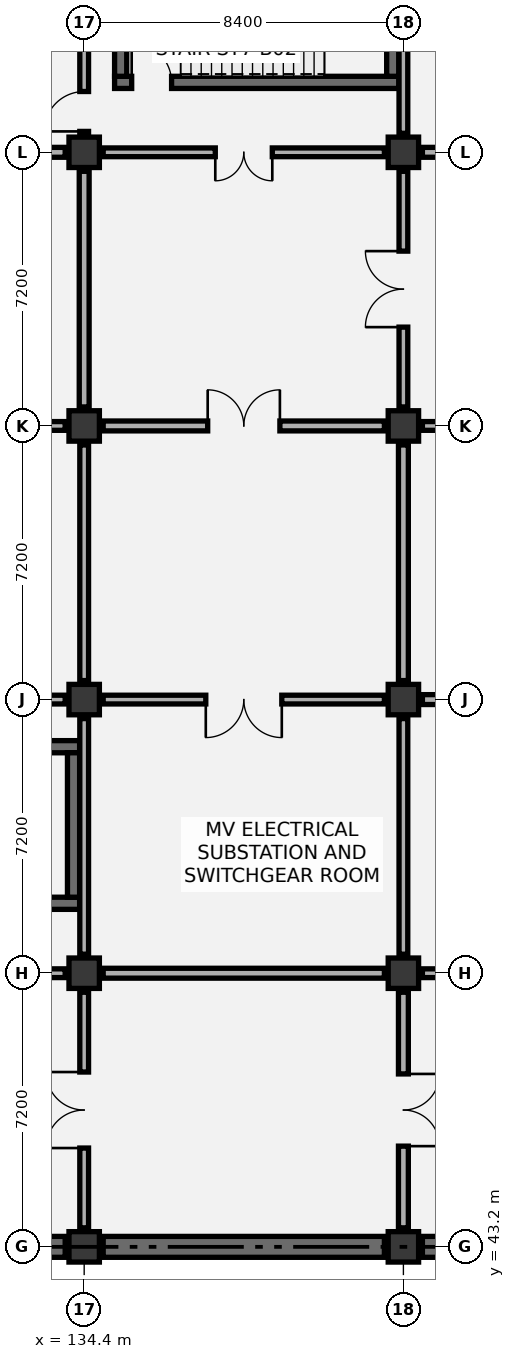
"""IFC4 building model, lengths in metres.
Left out: names, types, materials, properties, quantities, classifications, styles, units other than length and angle.
Written with IfcOpenShell. Run it as: python <this file> out.ifc"""

import sys

from ifc_helpers import new_model, si_unit, direction, frame, frame_2d, origin, origin_2d, place, context, subcontext, project, spatial, rectangle, extrude, element, fill, save


model = new_model("IFC4")
c1 = context("Model", 3, precision=1e-05, world=origin(), true_north=direction((0.0, 1.0)))
c2 = subcontext(c1, "Body", "Model", "MODEL_VIEW")
j1 = project(units=[si_unit("LENGTHUNIT", "METRE"), si_unit("PLANEANGLEUNIT", "RADIAN")], contexts=[c1])
p1 = place(None, origin())
s1 = spatial("IfcSite", under=j1, at=p1, CompositionType="ELEMENT")
p2 = place(p1, origin())
s2 = spatial("IfcBuilding", under=s1, at=p2, CompositionType="ELEMENT")
p3 = place(p2, frame((0.0, 0.0, -9.6)))
s3 = spatial("IfcBuildingStorey", under=s2, at=p3, CompositionType="ELEMENT", Elevation=-9.6)
for number, where, z_axis, x_axis in (
    (1, (134.4, 43.2, 0.0), (0.0, 0.0, 1.0), (1.0, 0.0, 0.0)),
    (2, (134.4, 50.4, 0.0), (0.0, 0.0, 1.0), (1.0, 0.0, 0.0)),
    (3, (134.4, 57.6, 0.0), (0.0, 0.0, 1.0), (1.0, 0.0, 0.0)),
    (4, (134.4, 64.8, 0.0), (0.0, 0.0, 1.0), (1.0, 0.0, 0.0)),
    (5, (134.4, 72.0, 0.0), (0.0, 0.0, 1.0), (1.0, 0.0, 0.0)),
    (6, (142.8, 43.2, 0.0), (0.0, 0.0, 1.0), (1.0, 0.0, 0.0)),
    (7, (142.8, 50.4, 0.0), (0.0, 0.0, 1.0), (1.0, 0.0, 0.0)),
    (8, (142.8, 57.6, 0.0), (0.0, 0.0, 1.0), (1.0, 0.0, 0.0)),
    (9, (142.8, 64.8, 0.0), (0.0, 0.0, 1.0), (1.0, 0.0, 0.0)),
    (10, (142.8, 72.0, 0.0), (0.0, 0.0, 1.0), (1.0, 0.0, 0.0)),
):
    element("IfcColumn", number, at=place(p3, frame(where, z_axis=z_axis, x_axis=x_axis)), inside=s3, PredefinedType="COLUMN", context=c2, shape_type="SweptSolid", body=[
        extrude(rectangle(XDim=0.8, YDim=0.8, at=origin_2d()), origin(), (0.0, 0.0, 1.0), 4.8),
    ])
p4 = place(p3, frame((126.5, 43.2, 0.0), z_axis=(0.0, 0.0, 1.0), x_axis=(1.0, 0.0, 0.0)))
e11 = element("IfcWall", 11, at=p4, inside=s3, PredefinedType="USERDEFINED", context=c2, shape_type="SweptSolid", body=[
    extrude(rectangle(XDim=7.4, YDim=0.55, at=frame_2d((3.7, 0.0))), origin(), (0.0, 0.0, 1.0), 4.4),
])
p5 = place(p3, frame((134.9, 43.2, 0.0), z_axis=(0.0, 0.0, 1.0), x_axis=(1.0, 0.0, 0.0)))
e12 = element("IfcWall", 12, at=p5, inside=s3, PredefinedType="USERDEFINED", context=c2, shape_type="SweptSolid", body=[
    extrude(rectangle(XDim=7.4, YDim=0.55, at=frame_2d((3.7, 0.0))), origin(), (0.0, 0.0, 1.0), 4.4),
])
p6 = place(p3, frame((143.3, 43.2, 0.0), z_axis=(0.0, 0.0, 1.0), x_axis=(1.0, 0.0, 0.0)))
e13 = element("IfcWall", 13, at=p6, inside=s3, PredefinedType="USERDEFINED", context=c2, shape_type="SweptSolid", body=[
    extrude(rectangle(XDim=7.4, YDim=0.55, at=frame_2d((3.7, 0.0))), origin(), (0.0, 0.0, 1.0), 4.4),
])
p7 = place(p3, frame((126.8, 52.24, 0.0), z_axis=(0.0, 0.0, 1.0), x_axis=(1.0, 0.0, 0.0)))
e14 = element("IfcWall", 14, at=p7, inside=s3, PredefinedType="SHEAR", context=c2, shape_type="SweptSolid", body=[
    extrude(rectangle(XDim=7.48, YDim=0.32, at=frame_2d((3.74, 0.0))), origin(), (0.0, 0.0, 1.0), 4.4),
])
p8 = place(p7, frame((0.45, 0.0, 0.0)))
e15 = element("IfcOpeningElement", 15, at=p8, cuts=e14, PredefinedType="OPENING", context=c2, shape_type="SweptSolid", body=[
    extrude(rectangle(XDim=1.05, YDim=2.15, at=frame_2d((0.525, 1.075))), frame((0.0, 0.17, 0.0), z_axis=(0.0, -1.0, 0.0), x_axis=(1.0, 0.0, 0.0)), (0.0, 0.0, 1.0), 0.34),
])
p9 = place(p3, frame((126.8, 56.36, 0.0), z_axis=(0.0, 0.0, 1.0), x_axis=(1.0, 0.0, 0.0)))
e16 = element("IfcWall", 16, at=p9, inside=s3, PredefinedType="SHEAR", context=c2, shape_type="SweptSolid", body=[
    extrude(rectangle(XDim=7.48, YDim=0.32, at=frame_2d((3.74, 0.0))), origin(), (0.0, 0.0, 1.0), 4.4),
])
p10 = place(p3, frame((134.12, 52.4, 0.0), z_axis=(0.0, 0.0, 1.0), x_axis=(0.0, 1.0, 0.0)))
e17 = element("IfcWall", 17, at=p10, inside=s3, PredefinedType="SHEAR", context=c2, shape_type="SweptSolid", body=[
    extrude(rectangle(XDim=3.8, YDim=0.32, at=frame_2d((1.9, 0.0))), origin(), (0.0, 0.0, 1.0), 4.4),
])
p11 = place(p3, frame((135.2, 73.84, 0.0), z_axis=(0.0, 0.0, 1.0), x_axis=(1.0, 0.0, 0.0)))
e18 = element("IfcWall", 18, at=p11, inside=s3, PredefinedType="SHEAR", context=c2, shape_type="SweptSolid", body=[
    extrude(rectangle(XDim=7.48, YDim=0.32, at=frame_2d((3.74, 0.0))), origin(), (0.0, 0.0, 1.0), 4.4),
])
p12 = place(p11, frame((0.45, 0.0, 0.0)))
e19 = element("IfcOpeningElement", 19, at=p12, cuts=e18, PredefinedType="OPENING", context=c2, shape_type="SweptSolid", body=[
    extrude(rectangle(XDim=1.05, YDim=2.15, at=frame_2d((0.525, 1.075))), frame((0.0, 0.17, 0.0), z_axis=(0.0, -1.0, 0.0), x_axis=(1.0, 0.0, 0.0)), (0.0, 0.0, 1.0), 0.34),
])
for number, where, z_axis, x_axis in (
    (20, (135.36, 74.0, 0.0), (0.0, 0.0, 1.0), (0.0, 1.0, 0.0)),
    (21, (142.52, 74.0, 0.0), (0.0, 0.0, 1.0), (0.0, 1.0, 0.0)),
):
    element("IfcWall", number, at=place(p3, frame(where, z_axis=z_axis, x_axis=x_axis)), inside=s3, PredefinedType="SHEAR", context=c2, shape_type="SweptSolid", body=[
        extrude(rectangle(XDim=3.8, YDim=0.32, at=frame_2d((1.9, 0.0))), origin(), (0.0, 0.0, 1.0), 4.4),
    ])
p13 = place(p3, frame((134.4, 43.7, 0.0), z_axis=(0.0, 0.0, 1.0), x_axis=(0.0, 1.0, 0.0)))
e22 = element("IfcWall", 22, at=p13, inside=s3, PredefinedType="PARTITIONING", context=c2, shape_type="SweptSolid", body=[
    extrude(rectangle(XDim=6.2, YDim=0.23, at=frame_2d((3.1, 0.0))), origin(), (0.0, 0.0, 1.0), 3.595),
])
p14 = place(p13, frame((2.1, 0.0, 0.0)))
e23 = element("IfcOpeningElement", 23, at=p14, cuts=e22, PredefinedType="OPENING", context=c2, shape_type="SweptSolid", body=[
    extrude(rectangle(XDim=2.0, YDim=2.35, at=frame_2d((1.0, 1.175))), frame((0.0, 0.125, 0.0), z_axis=(0.0, -1.0, 0.0), x_axis=(1.0, 0.0, 0.0)), (0.0, 0.0, 1.0), 0.25),
])
p15 = place(p3, frame((126.5, 50.4, 0.0), z_axis=(0.0, 0.0, 1.0), x_axis=(1.0, 0.0, 0.0)))
e24 = element("IfcWall", 24, at=p15, inside=s3, PredefinedType="PARTITIONING", context=c2, shape_type="SweptSolid", body=[
    extrude(rectangle(XDim=7.4, YDim=0.23, at=frame_2d((3.7, 0.0))), origin(), (0.0, 0.0, 1.0), 3.495),
])
p16 = place(p15, frame((2.95, 0.0, 0.0)))
e25 = element("IfcOpeningElement", 25, at=p16, cuts=e24, PredefinedType="OPENING", context=c2, shape_type="SweptSolid", body=[
    extrude(rectangle(XDim=1.5, YDim=2.15, at=frame_2d((0.75, 1.075))), frame((0.0, 0.125, 0.0), z_axis=(0.0, -1.0, 0.0), x_axis=(1.0, 0.0, 0.0)), (0.0, 0.0, 1.0), 0.25),
])
p17 = place(p3, frame((134.4, 50.9, 0.0), z_axis=(0.0, 0.0, 1.0), x_axis=(0.0, 1.0, 0.0)))
e26 = element("IfcWall", 26, at=p17, inside=s3, PredefinedType="PARTITIONING", context=c2, shape_type="SweptSolid", body=[
    extrude(rectangle(XDim=6.2, YDim=0.23, at=frame_2d((3.1, 0.0))), origin(), (0.0, 0.0, 1.0), 3.595),
])
p18 = place(p3, frame((126.5, 57.6, 0.0), z_axis=(0.0, 0.0, 1.0), x_axis=(1.0, 0.0, 0.0)))
e27 = element("IfcWall", 27, at=p18, inside=s3, PredefinedType="PARTITIONING", context=c2, shape_type="SweptSolid", body=[
    extrude(rectangle(XDim=7.4, YDim=0.23, at=frame_2d((3.7, 0.0))), origin(), (0.0, 0.0, 1.0), 3.495),
])
p19 = place(p3, frame((134.4, 58.1, 0.0), z_axis=(0.0, 0.0, 1.0), x_axis=(0.0, 1.0, 0.0)))
e28 = element("IfcWall", 28, at=p19, inside=s3, PredefinedType="PARTITIONING", context=c2, shape_type="SweptSolid", body=[
    extrude(rectangle(XDim=6.2, YDim=0.23, at=frame_2d((3.1, 0.0))), origin(), (0.0, 0.0, 1.0), 3.595),
])
p20 = place(p3, frame((126.5, 64.8, 0.0), z_axis=(0.0, 0.0, 1.0), x_axis=(1.0, 0.0, 0.0)))
e29 = element("IfcWall", 29, at=p20, inside=s3, PredefinedType="PARTITIONING", context=c2, shape_type="SweptSolid", body=[
    extrude(rectangle(XDim=7.4, YDim=0.23, at=frame_2d((3.7, 0.0))), origin(), (0.0, 0.0, 1.0), 3.495),
])
p21 = place(p20, frame((2.7, 0.0, 0.0)))
e30 = element("IfcOpeningElement", 30, at=p21, cuts=e29, PredefinedType="OPENING", context=c2, shape_type="SweptSolid", body=[
    extrude(rectangle(XDim=2.0, YDim=2.35, at=frame_2d((1.0, 1.175))), frame((0.0, 0.125, 0.0), z_axis=(0.0, -1.0, 0.0), x_axis=(1.0, 0.0, 0.0)), (0.0, 0.0, 1.0), 0.25),
])
p22 = place(p3, frame((134.4, 65.3, 0.0), z_axis=(0.0, 0.0, 1.0), x_axis=(0.0, 1.0, 0.0)))
e31 = element("IfcWall", 31, at=p22, inside=s3, PredefinedType="PARTITIONING", context=c2, shape_type="SweptSolid", body=[
    extrude(rectangle(XDim=6.2, YDim=0.26, at=frame_2d((3.1, 0.0))), origin(), (0.0, 0.0, 1.0), 3.595),
])
p23 = place(p3, frame((126.5, 72.0, 0.0), z_axis=(0.0, 0.0, 1.0), x_axis=(1.0, 0.0, 0.0)))
e32 = element("IfcWall", 32, at=p23, inside=s3, PredefinedType="PARTITIONING", context=c2, shape_type="SweptSolid", body=[
    extrude(rectangle(XDim=7.4, YDim=0.26, at=frame_2d((3.7, 0.0))), origin(), (0.0, 0.0, 1.0), 3.495),
])
p24 = place(p23, frame((2.75, 0.0, 0.0)))
e33 = element("IfcOpeningElement", 33, at=p24, cuts=e32, PredefinedType="OPENING", context=c2, shape_type="SweptSolid", body=[
    extrude(rectangle(XDim=1.9, YDim=2.3, at=frame_2d((0.95, 1.15))), frame((0.0, 0.14, 0.0), z_axis=(0.0, -1.0, 0.0), x_axis=(1.0, 0.0, 0.0)), (0.0, 0.0, 1.0), 0.28),
])
p25 = place(p3, frame((134.4, 72.5, 0.0), z_axis=(0.0, 0.0, 1.0), x_axis=(0.0, 1.0, 0.0)))
e34 = element("IfcWall", 34, at=p25, inside=s3, PredefinedType="PARTITIONING", context=c2, shape_type="SweptSolid", body=[
    extrude(rectangle(XDim=6.2, YDim=0.23, at=frame_2d((3.1, 0.0))), origin(), (0.0, 0.0, 1.0), 3.595),
])
p26 = place(p25, frame((0.05, 0.0, 0.0)))
e35 = element("IfcOpeningElement", 35, at=p26, cuts=e34, PredefinedType="OPENING", context=c2, shape_type="SweptSolid", body=[
    extrude(rectangle(XDim=1.05, YDim=2.15, at=frame_2d((0.525, 1.075))), frame((0.0, 0.125, 0.0), z_axis=(0.0, -1.0, 0.0), x_axis=(1.0, 0.0, 0.0)), (0.0, 0.0, 1.0), 0.25),
])
p27 = place(p3, frame((142.8, 43.7, 0.0), z_axis=(0.0, 0.0, 1.0), x_axis=(0.0, 1.0, 0.0)))
e36 = element("IfcWall", 36, at=p27, inside=s3, PredefinedType="PARTITIONING", context=c2, shape_type="SweptSolid", body=[
    extrude(rectangle(XDim=6.2, YDim=0.26, at=frame_2d((3.1, 0.0))), origin(), (0.0, 0.0, 1.0), 3.595),
])
p28 = place(p27, frame((2.15, 0.0, 0.0)))
e37 = element("IfcOpeningElement", 37, at=p28, cuts=e36, PredefinedType="OPENING", context=c2, shape_type="SweptSolid", body=[
    extrude(rectangle(XDim=1.9, YDim=2.3, at=frame_2d((0.95, 1.15))), frame((0.0, 0.14, 0.0), z_axis=(0.0, -1.0, 0.0), x_axis=(1.0, 0.0, 0.0)), (0.0, 0.0, 1.0), 0.28),
])
p29 = place(p3, frame((134.9, 50.4, 0.0), z_axis=(0.0, 0.0, 1.0), x_axis=(1.0, 0.0, 0.0)))
e38 = element("IfcWall", 38, at=p29, inside=s3, PredefinedType="PARTITIONING", context=c2, shape_type="SweptSolid", body=[
    extrude(rectangle(XDim=7.4, YDim=0.26, at=frame_2d((3.7, 0.0))), origin(), (0.0, 0.0, 1.0), 3.495),
])
p30 = place(p3, frame((142.8, 50.9, 0.0), z_axis=(0.0, 0.0, 1.0), x_axis=(0.0, 1.0, 0.0)))
e39 = element("IfcWall", 39, at=p30, inside=s3, PredefinedType="PARTITIONING", context=c2, shape_type="SweptSolid", body=[
    extrude(rectangle(XDim=6.2, YDim=0.23, at=frame_2d((3.1, 0.0))), origin(), (0.0, 0.0, 1.0), 3.595),
])
p31 = place(p3, frame((134.9, 57.6, 0.0), z_axis=(0.0, 0.0, 1.0), x_axis=(1.0, 0.0, 0.0)))
e40 = element("IfcWall", 40, at=p31, inside=s3, PredefinedType="PARTITIONING", context=c2, shape_type="SweptSolid", body=[
    extrude(rectangle(XDim=7.4, YDim=0.23, at=frame_2d((3.7, 0.0))), origin(), (0.0, 0.0, 1.0), 3.495),
])
p32 = place(p31, frame((2.7, 0.0, 0.0)))
e41 = element("IfcOpeningElement", 41, at=p32, cuts=e40, PredefinedType="OPENING", context=c2, shape_type="SweptSolid", body=[
    extrude(rectangle(XDim=2.0, YDim=2.35, at=frame_2d((1.0, 1.175))), frame((0.0, 0.125, 0.0), z_axis=(0.0, -1.0, 0.0), x_axis=(1.0, 0.0, 0.0)), (0.0, 0.0, 1.0), 0.25),
])
p33 = place(p3, frame((142.8, 58.1, 0.0), z_axis=(0.0, 0.0, 1.0), x_axis=(0.0, 1.0, 0.0)))
e42 = element("IfcWall", 42, at=p33, inside=s3, PredefinedType="PARTITIONING", context=c2, shape_type="SweptSolid", body=[
    extrude(rectangle(XDim=6.2, YDim=0.26, at=frame_2d((3.1, 0.0))), origin(), (0.0, 0.0, 1.0), 3.595),
])
p34 = place(p3, frame((134.9, 64.8, 0.0), z_axis=(0.0, 0.0, 1.0), x_axis=(1.0, 0.0, 0.0)))
e43 = element("IfcWall", 43, at=p34, inside=s3, PredefinedType="PARTITIONING", context=c2, shape_type="SweptSolid", body=[
    extrude(rectangle(XDim=7.4, YDim=0.26, at=frame_2d((3.7, 0.0))), origin(), (0.0, 0.0, 1.0), 3.495),
])
p35 = place(p34, frame((2.75, 0.0, 0.0)))
e44 = element("IfcOpeningElement", 44, at=p35, cuts=e43, PredefinedType="OPENING", context=c2, shape_type="SweptSolid", body=[
    extrude(rectangle(XDim=1.9, YDim=2.3, at=frame_2d((0.95, 1.15))), frame((0.0, 0.14, 0.0), z_axis=(0.0, -1.0, 0.0), x_axis=(1.0, 0.0, 0.0)), (0.0, 0.0, 1.0), 0.28),
])
p36 = place(p3, frame((142.8, 65.3, 0.0), z_axis=(0.0, 0.0, 1.0), x_axis=(0.0, 1.0, 0.0)))
e45 = element("IfcWall", 45, at=p36, inside=s3, PredefinedType="PARTITIONING", context=c2, shape_type="SweptSolid", body=[
    extrude(rectangle(XDim=6.2, YDim=0.23, at=frame_2d((3.1, 0.0))), origin(), (0.0, 0.0, 1.0), 3.595),
])
p37 = place(p36, frame((2.1, 0.0, 0.0)))
e46 = element("IfcOpeningElement", 46, at=p37, cuts=e45, PredefinedType="OPENING", context=c2, shape_type="SweptSolid", body=[
    extrude(rectangle(XDim=2.0, YDim=2.35, at=frame_2d((1.0, 1.175))), frame((0.0, 0.125, 0.0), z_axis=(0.0, -1.0, 0.0), x_axis=(1.0, 0.0, 0.0)), (0.0, 0.0, 1.0), 0.25),
])
p38 = place(p3, frame((134.9, 72.0, 0.0), z_axis=(0.0, 0.0, 1.0), x_axis=(1.0, 0.0, 0.0)))
e47 = element("IfcWall", 47, at=p38, inside=s3, PredefinedType="PARTITIONING", context=c2, shape_type="SweptSolid", body=[
    extrude(rectangle(XDim=7.4, YDim=0.23, at=frame_2d((3.7, 0.0))), origin(), (0.0, 0.0, 1.0), 3.495),
])
p39 = place(p38, frame((2.95, 0.0, 0.0)))
e48 = element("IfcOpeningElement", 48, at=p39, cuts=e47, PredefinedType="OPENING", context=c2, shape_type="SweptSolid", body=[
    extrude(rectangle(XDim=1.5, YDim=2.15, at=frame_2d((0.75, 1.075))), frame((0.0, 0.125, 0.0), z_axis=(0.0, -1.0, 0.0), x_axis=(1.0, 0.0, 0.0)), (0.0, 0.0, 1.0), 0.25),
])
p40 = place(p3, frame((142.8, 72.5, 0.0), z_axis=(0.0, 0.0, 1.0), x_axis=(0.0, 1.0, 0.0)))
e49 = element("IfcWall", 49, at=p40, inside=s3, PredefinedType="PARTITIONING", context=c2, shape_type="SweptSolid", body=[
    extrude(rectangle(XDim=6.2, YDim=0.23, at=frame_2d((3.1, 0.0))), origin(), (0.0, 0.0, 1.0), 3.595),
])
p41 = place(p3, frame((143.3, 50.4, 0.0), z_axis=(0.0, 0.0, 1.0), x_axis=(1.0, 0.0, 0.0)))
e50 = element("IfcWall", 50, at=p41, inside=s3, PredefinedType="PARTITIONING", context=c2, shape_type="SweptSolid", body=[
    extrude(rectangle(XDim=7.4, YDim=0.23, at=frame_2d((3.7, 0.0))), origin(), (0.0, 0.0, 1.0), 3.495),
])
p42 = place(p3, frame((143.3, 57.6, 0.0), z_axis=(0.0, 0.0, 1.0), x_axis=(1.0, 0.0, 0.0)))
e51 = element("IfcWall", 51, at=p42, inside=s3, PredefinedType="PARTITIONING", context=c2, shape_type="SweptSolid", body=[
    extrude(rectangle(XDim=7.4, YDim=0.26, at=frame_2d((3.7, 0.0))), origin(), (0.0, 0.0, 1.0), 3.495),
])
p43 = place(p42, frame((2.7, 0.0, 0.0)))
e52 = element("IfcOpeningElement", 52, at=p43, cuts=e51, PredefinedType="OPENING", context=c2, shape_type="SweptSolid", body=[
    extrude(rectangle(XDim=2.0, YDim=2.35, at=frame_2d((1.0, 1.175))), frame((0.0, 0.14, 0.0), z_axis=(0.0, -1.0, 0.0), x_axis=(1.0, 0.0, 0.0)), (0.0, 0.0, 1.0), 0.28),
])
p44 = place(p3, frame((143.3, 64.8, 0.0), z_axis=(0.0, 0.0, 1.0), x_axis=(1.0, 0.0, 0.0)))
e53 = element("IfcWall", 53, at=p44, inside=s3, PredefinedType="PARTITIONING", context=c2, shape_type="SweptSolid", body=[
    extrude(rectangle(XDim=7.4, YDim=0.23, at=frame_2d((3.7, 0.0))), origin(), (0.0, 0.0, 1.0), 3.495),
])
p45 = place(p44, frame((2.75, 0.0, 0.0)))
e54 = element("IfcOpeningElement", 54, at=p45, cuts=e53, PredefinedType="OPENING", context=c2, shape_type="SweptSolid", body=[
    extrude(rectangle(XDim=1.9, YDim=2.3, at=frame_2d((0.95, 1.15))), frame((0.0, 0.125, 0.0), z_axis=(0.0, -1.0, 0.0), x_axis=(1.0, 0.0, 0.0)), (0.0, 0.0, 1.0), 0.25),
])
p46 = place(p3, frame((143.3, 72.0, 0.0), z_axis=(0.0, 0.0, 1.0), x_axis=(1.0, 0.0, 0.0)))
e55 = element("IfcWall", 55, at=p46, inside=s3, PredefinedType="PARTITIONING", context=c2, shape_type="SweptSolid", body=[
    extrude(rectangle(XDim=7.4, YDim=0.26, at=frame_2d((3.7, 0.0))), origin(), (0.0, 0.0, 1.0), 3.495),
])
p47 = place(p46, frame((2.75, 0.0, 0.0)))
e56 = element("IfcOpeningElement", 56, at=p47, cuts=e55, PredefinedType="OPENING", context=c2, shape_type="SweptSolid", body=[
    extrude(rectangle(XDim=1.9, YDim=2.3, at=frame_2d((0.95, 1.15))), frame((0.0, 0.14, 0.0), z_axis=(0.0, -1.0, 0.0), x_axis=(1.0, 0.0, 0.0)), (0.0, 0.0, 1.0), 0.28),
])
p48 = place(p12, origin())
e57 = element("IfcDoor", 57, at=p48, inside=s3, OperationType="SINGLE_SWING_LEFT", PredefinedType="DOOR", context=c2, shape_type="SweptSolid", body=[
    extrude(rectangle(XDim=1.05, YDim=2.15, at=frame_2d((0.525, 1.075))), frame((0.0, 0.025, 0.0), z_axis=(0.0, -1.0, 0.0), x_axis=(1.0, 0.0, 0.0)), (0.0, 0.0, 1.0), 0.05),
])
fill(e19, e57)
p49 = place(p14, origin())
e58 = element("IfcDoor", 58, at=p49, inside=s3, OperationType="DOUBLE_DOOR_SINGLE_SWING", PredefinedType="DOOR", context=c2, shape_type="SweptSolid", body=[
    extrude(rectangle(XDim=2.0, YDim=2.35, at=frame_2d((1.0, 1.175))), frame((0.0, 0.025, 0.0), z_axis=(0.0, -1.0, 0.0), x_axis=(1.0, 0.0, 0.0)), (0.0, 0.0, 1.0), 0.05),
])
fill(e23, e58)
p50 = place(p26, origin())
e59 = element("IfcDoor", 59, at=p50, inside=s3, OperationType="SINGLE_SWING_LEFT", PredefinedType="DOOR", context=c2, shape_type="SweptSolid", body=[
    extrude(rectangle(XDim=1.05, YDim=2.15, at=frame_2d((0.525, 1.075))), frame((0.0, 0.025, 0.0), z_axis=(0.0, -1.0, 0.0), x_axis=(1.0, 0.0, 0.0)), (0.0, 0.0, 1.0), 0.05),
])
fill(e35, e59)
p51 = place(p28, frame((1.9, 0.0, 0.0), z_axis=(0.0, 0.0, 1.0), x_axis=(-1.0, 0.0, 0.0)))
e60 = element("IfcDoor", 60, at=p51, inside=s3, OperationType="DOUBLE_DOOR_SINGLE_SWING", PredefinedType="DOOR", context=c2, shape_type="SweptSolid", body=[
    extrude(rectangle(XDim=1.9, YDim=2.3, at=frame_2d((0.95, 1.15))), frame((0.0, 0.025, 0.0), z_axis=(0.0, -1.0, 0.0), x_axis=(1.0, 0.0, 0.0)), (0.0, 0.0, 1.0), 0.05),
])
fill(e37, e60)
p52 = place(p32, frame((2.0, 0.0, 0.0), z_axis=(0.0, 0.0, 1.0), x_axis=(-1.0, 0.0, 0.0)))
e61 = element("IfcDoor", 61, at=p52, inside=s3, OperationType="DOUBLE_DOOR_SINGLE_SWING", PredefinedType="DOOR", context=c2, shape_type="SweptSolid", body=[
    extrude(rectangle(XDim=2.0, YDim=2.35, at=frame_2d((1.0, 1.175))), frame((0.0, 0.025, 0.0), z_axis=(0.0, -1.0, 0.0), x_axis=(1.0, 0.0, 0.0)), (0.0, 0.0, 1.0), 0.05),
])
fill(e41, e61)
p53 = place(p35, origin())
e62 = element("IfcDoor", 62, at=p53, inside=s3, OperationType="DOUBLE_DOOR_SINGLE_SWING", PredefinedType="DOOR", context=c2, shape_type="SweptSolid", body=[
    extrude(rectangle(XDim=1.9, YDim=2.3, at=frame_2d((0.95, 1.15))), frame((0.0, 0.025, 0.0), z_axis=(0.0, -1.0, 0.0), x_axis=(1.0, 0.0, 0.0)), (0.0, 0.0, 1.0), 0.05),
])
fill(e44, e62)
p54 = place(p37, origin())
e63 = element("IfcDoor", 63, at=p54, inside=s3, OperationType="DOUBLE_DOOR_SINGLE_SWING", PredefinedType="DOOR", context=c2, shape_type="SweptSolid", body=[
    extrude(rectangle(XDim=2.0, YDim=2.35, at=frame_2d((1.0, 1.175))), frame((0.0, 0.025, 0.0), z_axis=(0.0, -1.0, 0.0), x_axis=(1.0, 0.0, 0.0)), (0.0, 0.0, 1.0), 0.05),
])
fill(e46, e63)
p55 = place(p39, frame((1.5, 0.0, 0.0), z_axis=(0.0, 0.0, 1.0), x_axis=(-1.0, 0.0, 0.0)))
e64 = element("IfcDoor", 64, at=p55, inside=s3, OperationType="DOUBLE_DOOR_SINGLE_SWING", PredefinedType="DOOR", context=c2, shape_type="SweptSolid", body=[
    extrude(rectangle(XDim=1.5, YDim=2.15, at=frame_2d((0.75, 1.075))), frame((0.0, 0.025, 0.0), z_axis=(0.0, -1.0, 0.0), x_axis=(1.0, 0.0, 0.0)), (0.0, 0.0, 1.0), 0.05),
])
fill(e48, e64)
save(model, sys.argv[1])
